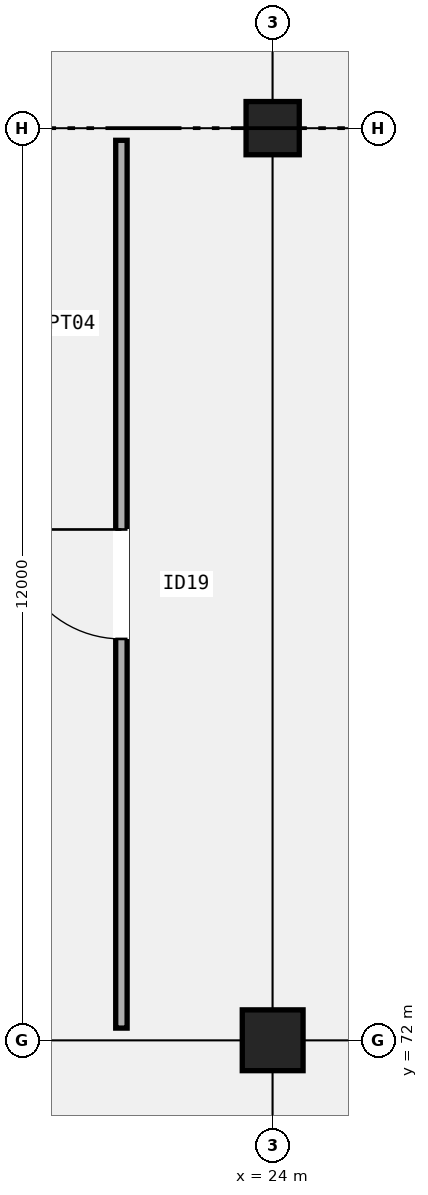
"""IFC4 building model, lengths in metres.
Left out: names, types, materials, properties, quantities, classifications, styles, units other than length and angle.
Written with IfcOpenShell. Run it as: python <this file> out.ifc"""

import sys

from ifc_helpers import new_model, si_unit, direction, frame, frame_2d, origin, origin_2d, place, context, subcontext, project, spatial, rectangle, extrude, element, fill, save


model = new_model("IFC4")
c1 = context("Model", 3, precision=1e-05, world=origin(), true_north=direction((0.0, 1.0)))
c2 = subcontext(c1, "Body", "Model", "MODEL_VIEW")
j1 = project(units=[si_unit("LENGTHUNIT", "METRE"), si_unit("PLANEANGLEUNIT", "RADIAN")], contexts=[c1])
p1 = place(None, origin())
s1 = spatial("IfcSite", under=j1, at=p1, CompositionType="ELEMENT")
p2 = place(p1, origin())
s2 = spatial("IfcBuilding", under=s1, at=p2, CompositionType="ELEMENT")
p3 = place(p2, frame((0.0, 0.0, 15.3)))
s3 = spatial("IfcBuildingStorey", under=s2, at=p3, CompositionType="ELEMENT", Elevation=15.3)
p4 = place(p3, frame((24.0, 72.0, 0.0), z_axis=(0.0, 0.0, 1.0), x_axis=(1.0, 0.0, 0.0)))
e1 = element("IfcColumn", 1, at=p4, inside=s3, PredefinedType="COLUMN", context=c2, shape_type="SweptSolid", body=[
    extrude(rectangle(XDim=0.8, YDim=0.8, at=origin_2d()), origin(), (0.0, 0.0, 1.0), 5.1),
])
p5 = place(p3, frame((24.0, 84.0, 0.0), z_axis=(0.0, 0.0, 1.0), x_axis=(1.0, 0.0, 0.0)))
e2 = element("IfcColumn", 2, at=p5, inside=s3, PredefinedType="COLUMN", context=c2, shape_type="SweptSolid", body=[
    extrude(rectangle(XDim=0.7, YDim=0.7, at=origin_2d()), origin(), (0.0, 0.0, 1.0), 5.1),
])
p6 = place(p3, frame((22.01, 72.16, 0.0), z_axis=(0.0, 0.0, 1.0), x_axis=(0.0, 1.0, 0.0)))
e3 = element("IfcWall", 3, at=p6, inside=s3, PredefinedType="PARTITIONING", context=c2, shape_type="SweptSolid", body=[
    extrude(rectangle(XDim=11.68, YDim=0.15, at=frame_2d((5.84, 0.0))), origin(), (0.0, 0.0, 1.0), 4.22),
])
p7 = place(p6, frame((5.12, 0.0, 0.0)))
e4 = element("IfcOpeningElement", 4, at=p7, cuts=e3, PredefinedType="OPENING", context=c2, shape_type="SweptSolid", body=[
    extrude(rectangle(XDim=1.44, YDim=2.26, at=frame_2d((0.72, 1.13))), frame((0.0, 0.085, 0.0), z_axis=(0.0, -1.0, 0.0), x_axis=(1.0, 0.0, 0.0)), (0.0, 0.0, 1.0), 0.17),
])
p8 = place(p7, origin())
e5 = element("IfcDoor", 5, at=p8, inside=s3, OperationType="SINGLE_SWING_RIGHT", PredefinedType="DOOR", context=c2, shape_type="SweptSolid", body=[
    extrude(rectangle(XDim=1.44, YDim=2.26, at=frame_2d((0.72, 1.13))), frame((0.0, 0.025, 0.0), z_axis=(0.0, -1.0, 0.0), x_axis=(1.0, 0.0, 0.0)), (0.0, 0.0, 1.0), 0.05),
])
fill(e4, e5)
save(model, sys.argv[1])
